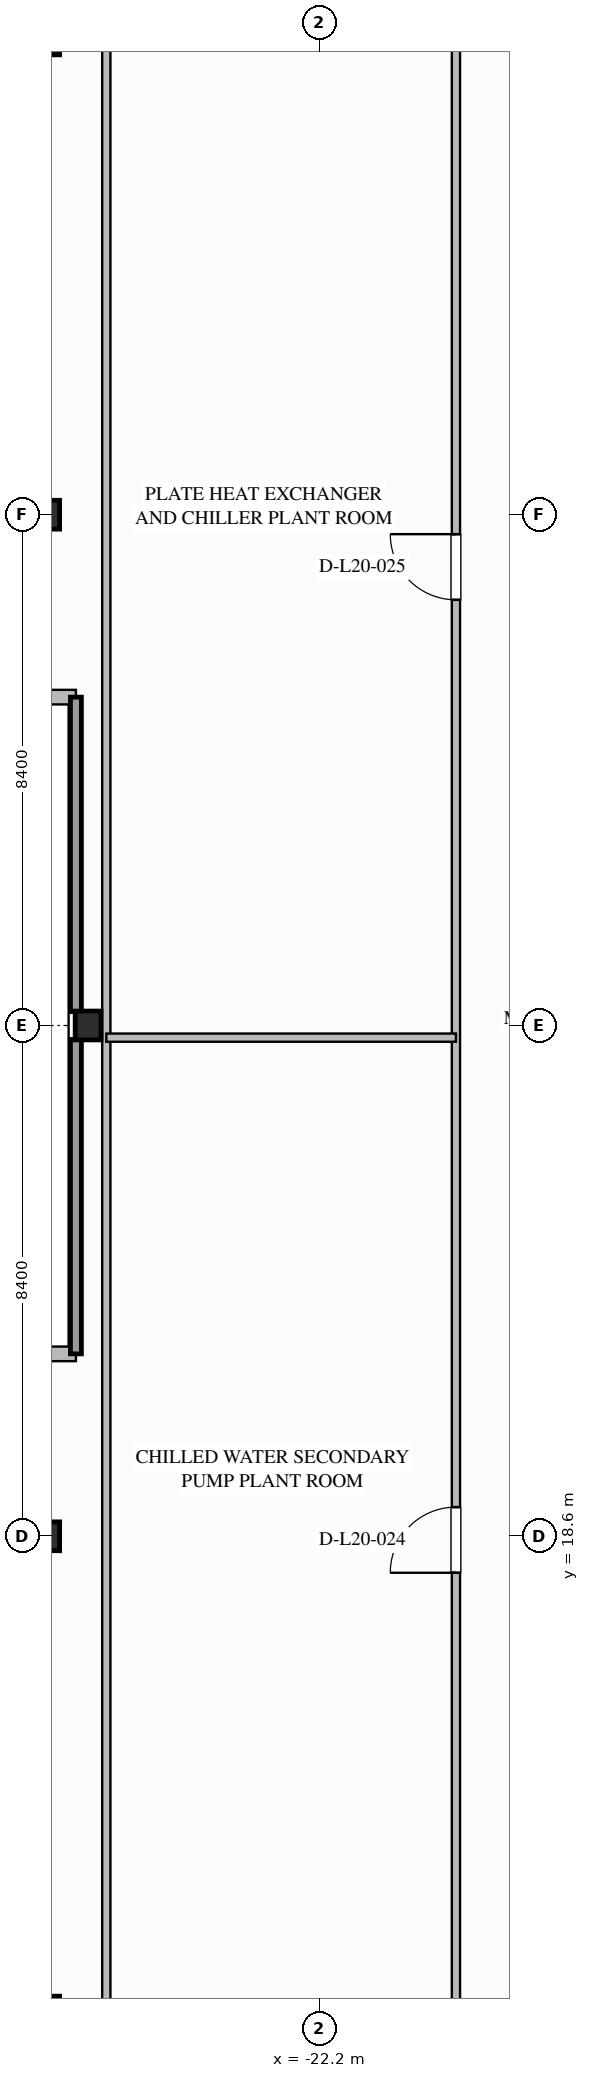
"""IFC4 building model, lengths in metres.
Left out: names, types, materials, properties, quantities, classifications, styles, units other than length and angle.
Written with IfcOpenShell. Run it as: python <this file> out.ifc"""

import sys

from ifc_helpers import new_model, si_unit, direction, frame, frame_2d, origin, origin_2d, place, context, subcontext, project, spatial, rectangle, i_section, extrude, element, fill, save


model = new_model("IFC4")
c1 = context("Model", 3, precision=1e-05, world=origin(), true_north=direction((0.0, 1.0)))
c2 = subcontext(c1, "Body", "Model", "MODEL_VIEW")
j1 = project(units=[si_unit("LENGTHUNIT", "METRE"), si_unit("PLANEANGLEUNIT", "RADIAN")], contexts=[c1])
p1 = place(None, origin())
s1 = spatial("IfcSite", under=j1, at=p1, CompositionType="ELEMENT")
p2 = place(p1, origin())
s2 = spatial("IfcBuilding", under=s1, at=p2, CompositionType="ELEMENT")
p3 = place(p2, frame((0.0, 0.0, 82.2)))
s3 = spatial("IfcBuildingStorey", under=s2, at=p3, CompositionType="ELEMENT", Elevation=82.2)
for number, where, z_axis, x_axis in (
    (1, (-26.68, 10.8, 0.0), (0.0, 0.0, 1.0), (1.0, 0.0, 0.0)),
    (2, (-26.68, 18.6, 0.0), (0.0, 0.0, 1.0), (1.0, 0.0, 0.0)),
    (3, (-26.0, 27.0, 0.0), (0.0, 0.0, 1.0), (1.0, 0.0, 0.0)),
    (4, (-26.68, 35.4, 0.0), (0.0, 0.0, 1.0), (1.0, 0.0, 0.0)),
    (5, (-26.68, 43.2, 0.0), (0.0, 0.0, 1.0), (1.0, 0.0, 0.0)),
):
    element("IfcColumn", number, at=place(p3, frame(where, z_axis=z_axis, x_axis=x_axis)), inside=s3, PredefinedType="COLUMN", context=c2, shape_type="SweptSolid", body=[
        extrude(i_section(OverallWidth=0.424, OverallDepth=0.474, WebThickness=0.048, FlangeThickness=0.077, FilletRadius=0.03, at=origin_2d()), origin(), (0.0, 0.0, 1.0), 4.997),
    ])
for number, where, z_axis, x_axis in (
    (6, (-26.88, 21.6, 0.0), (0.0, 0.0, 1.0), (1.0, 0.0, 0.0)),
    (7, (-26.2, 32.4, 0.0), (0.0, 0.0, 1.0), (-1.0, 0.0, 0.0)),
):
    element("IfcWall", number, at=place(p3, frame(where, z_axis=z_axis, x_axis=x_axis)), inside=s3, PredefinedType="STANDARD", context=c2, shape_type="SweptSolid", body=[
        extrude(rectangle(XDim=0.68, YDim=0.24, at=frame_2d((0.34, 0.0))), origin(), (0.0, 0.0, 1.0), 4.7),
    ])
p4 = place(p3, frame((-25.7, 6.6, 0.0), z_axis=(0.0, 0.0, 1.0), x_axis=(0.0, 1.0, 0.0)))
e8 = element("IfcWall", 8, at=p4, inside=s3, PredefinedType="PARTITIONING", context=c2, shape_type="SweptSolid", body=[
    extrude(rectangle(XDim=40.6, YDim=0.135, at=frame_2d((20.3, 0.0))), origin(), (0.0, 0.0, 1.0), 4.074),
])
p5 = place(p3, frame((-19.95, 6.8, 0.0), z_axis=(0.0, 0.0, 1.0), x_axis=(0.0, 1.0, 0.0)))
e9 = element("IfcWall", 9, at=p5, inside=s3, PredefinedType="PARTITIONING", context=c2, shape_type="SweptSolid", body=[
    extrude(rectangle(XDim=40.2, YDim=0.135, at=frame_2d((20.1, 0.0))), origin(), (0.0, 0.0, 1.0), 4.7),
])
p6 = place(p5, frame((11.2, 0.0, 0.0)))
e10 = element("IfcOpeningElement", 10, at=p6, cuts=e9, PredefinedType="OPENING", context=c2, shape_type="SweptSolid", body=[
    extrude(rectangle(XDim=1.08, YDim=2.04, at=frame_2d((0.54, 1.02))), frame((0.0, 0.077, 0.0), z_axis=(0.0, -1.0, 0.0), x_axis=(1.0, 0.0, 0.0)), (0.0, 0.0, 1.0), 0.155),
])
p7 = place(p5, frame((27.2, 0.0, 0.0)))
e11 = element("IfcOpeningElement", 11, at=p7, cuts=e9, PredefinedType="OPENING", context=c2, shape_type="SweptSolid", body=[
    extrude(rectangle(XDim=1.08, YDim=2.04, at=frame_2d((0.54, 1.02))), frame((0.0, 0.077, 0.0), z_axis=(0.0, -1.0, 0.0), x_axis=(1.0, 0.0, 0.0)), (0.0, 0.0, 1.0), 0.155),
])
p8 = place(p3, frame((-25.7, 26.8, 0.0), z_axis=(0.0, 0.0, 1.0), x_axis=(1.0, 0.0, 0.0)))
e12 = element("IfcWall", 12, at=p8, inside=s3, PredefinedType="PARTITIONING", context=c2, shape_type="SweptSolid", body=[
    extrude(rectangle(XDim=5.75, YDim=0.135, at=frame_2d((2.875, 0.0))), origin(), (0.0, 0.0, 1.0), 3.912),
])
p9 = place(p6, origin())
e13 = element("IfcDoor", 13, at=p9, inside=s3, OperationType="SINGLE_SWING_LEFT", PredefinedType="DOOR", context=c2, shape_type="SweptSolid", body=[
    extrude(rectangle(XDim=1.08, YDim=2.04, at=frame_2d((0.54, 1.02))), frame((0.0, 0.025, 0.0), z_axis=(0.0, -1.0, 0.0), x_axis=(1.0, 0.0, 0.0)), (0.0, 0.0, 1.0), 0.05),
])
fill(e10, e13)
p10 = place(p7, origin())
e14 = element("IfcDoor", 14, at=p10, inside=s3, OperationType="SINGLE_SWING_RIGHT", PredefinedType="DOOR", context=c2, shape_type="SweptSolid", body=[
    extrude(rectangle(XDim=1.08, YDim=2.04, at=frame_2d((0.54, 1.02))), frame((0.0, 0.025, 0.0), z_axis=(0.0, -1.0, 0.0), x_axis=(1.0, 0.0, 0.0)), (0.0, 0.0, 1.0), 0.05),
])
fill(e11, e14)
save(model, sys.argv[1])
